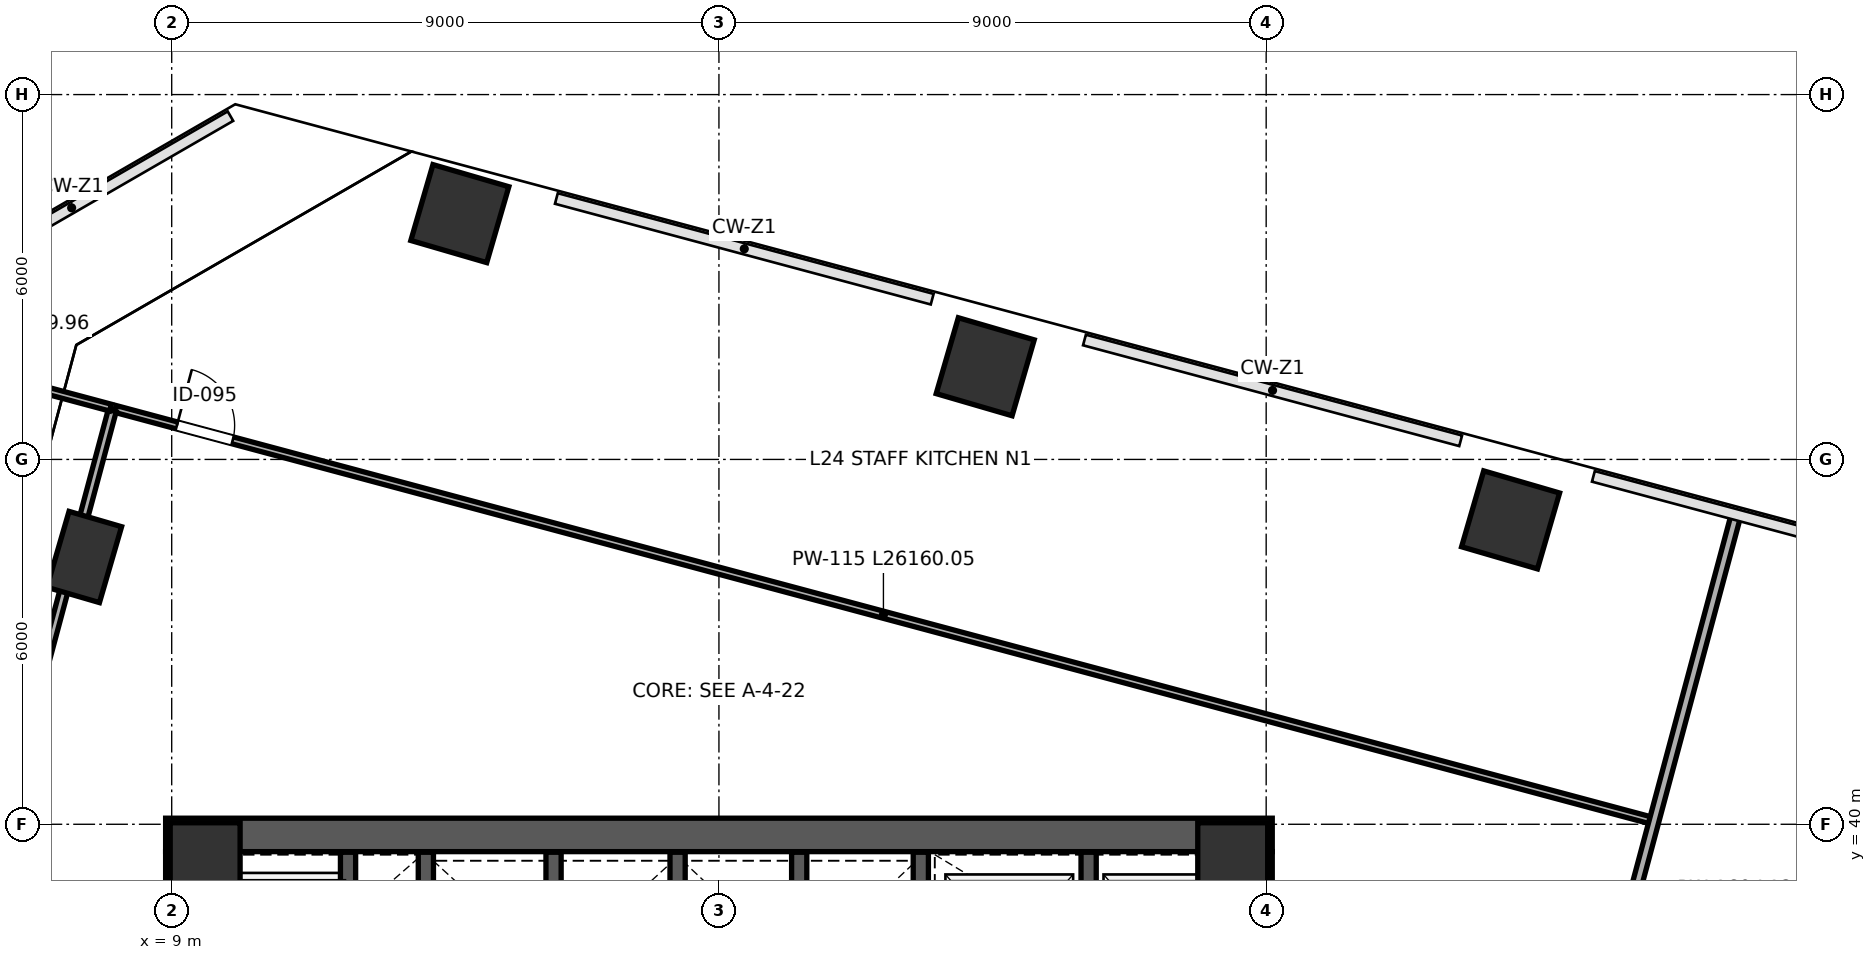
"""IFC4 building model, lengths in metres.
Left out: names, types, materials, properties, quantities, classifications, styles, units other than length and angle.
Written with IfcOpenShell. Run it as: python <this file> out.ifc"""

import sys

from ifc_helpers import new_model, si_unit, direction, frame, frame_2d, origin, origin_2d, place, context, subcontext, project, spatial, rectangle, extrude, clip, halfspace, source, transform, mapped, element, fill, save


model = new_model("IFC4")
c1 = context("Model", 3, precision=1e-05, world=origin(), true_north=direction((0.0, 1.0)))
c2 = subcontext(c1, "Body", "Model", "MODEL_VIEW")
j1 = project(units=[si_unit("LENGTHUNIT", "METRE"), si_unit("PLANEANGLEUNIT", "RADIAN")], contexts=[c1])
p1 = place(None, origin())
s1 = spatial("IfcSite", under=j1, at=p1, CompositionType="ELEMENT")
p2 = place(p1, origin())
s2 = spatial("IfcBuilding", under=s1, at=p2, CompositionType="ELEMENT")
p3 = place(p2, frame((0.0, 0.0, 108.4)))
s3 = spatial("IfcBuildingStorey", under=s2, at=p3, CompositionType="ELEMENT", Elevation=108.4)
m1 = source(origin(), c2, "Body", "SweptSolid", [
    extrude(rectangle(XDim=1.15, YDim=1.15, at=origin_2d()), origin(), (0.0, 0.0, 1.0), 4.199),
])
for number, where, z_axis, x_axis in (
    (1, (9.55, 39.45, 0.001), (0.0, 0.0, 1.0), (1.0, 0.0, 0.0)),
    (2, (26.45, 39.45, 0.001), (0.0, 0.0, 1.0), (1.0, 0.0, 0.0)),
):
    element("IfcColumn", number, at=place(p3, frame(where, z_axis=z_axis, x_axis=x_axis)), inside=s3, PredefinedType="COLUMN", context=c2, shape_type="MappedRepresentation", body=[
        mapped(m1, transform((0.0, 0.0, 0.0), scale=1.0)),
    ])
p4 = place(p3, frame((13.739, 50.042, 0.0), z_axis=(0.093677778231, 0.039090233385, 0.994834874499), x_axis=(0.112802709972, -0.993211324356, 0.028404467863)))
e3 = element("IfcColumn", 3, at=p4, inside=s3, PredefinedType="COLUMN", context=c2, shape_type="Clipping", body=[
    clip(clip(extrude(rectangle(XDim=1.3, YDim=1.3, at=origin_2d()), origin(), (0.0, 0.0, 1.0), 4.222), halfspace(frame((0.0, 0.0, 0.083), z_axis=(0.0, 0.0, -1.0), x_axis=(1.0, 0.0, 0.0)), False)), halfspace(frame((0.0, 0.0, 4.139), z_axis=(0.0, 0.0, 1.0), x_axis=(1.0, 0.0, 0.0)), False)),
])
p5 = place(p3, frame((22.379, 47.524, 0.0), z_axis=(0.080358858552, -0.005446094235, 0.996751119342), x_axis=(-0.343197283927, -0.938992890453, 0.022538322547)))
e4 = element("IfcColumn", 4, at=p5, inside=s3, PredefinedType="COLUMN", context=c2, shape_type="Clipping", body=[
    clip(clip(extrude(rectangle(XDim=1.3, YDim=1.3, at=origin_2d()), origin(), (0.0, 0.0, 1.0), 4.214), halfspace(frame((0.0, 0.0, 0.066), z_axis=(0.0, 0.0, -1.0), x_axis=(1.0, 0.0, 0.0)), False)), halfspace(frame((0.0, 0.0, 4.148), z_axis=(0.0, 0.0, 1.0), x_axis=(1.0, 0.0, 0.0)), False)),
])
p6 = place(p3, frame((31.02, 45.006, 0.0), z_axis=(0.066728027674, -0.04998809712, 0.996518218835), x_axis=(-0.798779681404, -0.601171101376, 0.023330826115)))
e5 = element("IfcColumn", 5, at=p6, inside=s3, PredefinedType="COLUMN", context=c2, shape_type="Clipping", body=[
    clip(clip(extrude(rectangle(XDim=1.3, YDim=1.3, at=origin_2d()), origin(), (0.0, 0.0, 1.0), 4.215), halfspace(frame((0.0, 0.0, 0.068), z_axis=(0.0, 0.0, -1.0), x_axis=(1.0, 0.0, 0.0)), False)), halfspace(frame((0.0, 0.0, 4.147), z_axis=(0.0, 0.0, 1.0), x_axis=(1.0, 0.0, 0.0)), False)),
])
p7 = place(p3, frame((7.562, 44.396, 0.0), z_axis=(0.064855729905, 0.071335517371, 0.995341638966), x_axis=(0.522988465649, -0.85191268616, 0.026978509186)))
e6 = element("IfcColumn", 6, at=p7, inside=s3, PredefinedType="PILASTER", context=c2, shape_type="Clipping", body=[
    clip(clip(extrude(rectangle(XDim=0.9, YDim=1.3, at=origin_2d()), origin(), (0.0, 0.0, 1.0), 4.22), halfspace(frame((0.0, 0.0, 0.073), z_axis=(0.0, 0.0, -1.0), x_axis=(1.0, 0.0, 0.0)), False)), halfspace(frame((0.0, 0.0, 4.146), z_axis=(0.0, 0.0, 1.0), x_axis=(1.0, 0.0, 0.0)), False)),
])
p8 = place(p3, frame((9.175, 24.45, 0.0), z_axis=(0.0, 0.0, 1.0), x_axis=(0.0, 1.0, 0.0)))
e7 = element("IfcWall", 7, at=p8, inside=s3, PredefinedType="SHEAR", context=c2, shape_type="SweptSolid", body=[
    extrude(rectangle(XDim=15.1, YDim=0.55, at=frame_2d((7.55, 0.0))), origin(), (0.0, 0.0, 1.0), 3.96),
])
p9 = place(p3, frame((26.825, 24.45, 0.0), z_axis=(0.0, 0.0, 1.0), x_axis=(0.0, 1.0, 0.0)))
e8 = element("IfcWall", 8, at=p9, inside=s3, PredefinedType="SHEAR", context=c2, shape_type="SweptSolid", body=[
    extrude(rectangle(XDim=15.1, YDim=0.55, at=frame_2d((7.55, 0.0))), origin(), (0.0, 0.0, 1.0), 3.96),
])
p10 = place(p9, frame((8.6, 0.0, 0.0)))
e9 = element("IfcOpeningElement", 9, at=p10, cuts=e8, PredefinedType="OPENING", context=c2, shape_type="SweptSolid", body=[
    extrude(rectangle(XDim=1.15, YDim=2.2, at=frame_2d((0.575, 1.1))), frame((0.0, 0.285, 0.0), z_axis=(0.0, -1.0, 0.0), x_axis=(1.0, 0.0, 0.0)), (0.0, 0.0, 1.0), 0.57),
])
p11 = place(p3, frame((8.9, 39.825, 0.0), z_axis=(0.0, 0.0, 1.0), x_axis=(1.0, 0.0, 0.0)))
e10 = element("IfcWall", 10, at=p11, inside=s3, PredefinedType="SHEAR", context=c2, shape_type="SweptSolid", body=[
    extrude(rectangle(XDim=18.2, YDim=0.55, at=frame_2d((9.1, 0.0))), origin(), (0.0, 0.0, 1.0), 3.96),
])
p12 = place(p3, frame((21.32, 32.12, 0.0), z_axis=(0.0, 0.0, 1.0), x_axis=(0.0, 1.0, 0.0)))
e11 = element("IfcWall", 11, at=p12, inside=s3, PredefinedType="SHEAR", context=c2, shape_type="SweptSolid", body=[
    extrude(rectangle(XDim=7.42, YDim=0.25, at=frame_2d((3.71, 0.0))), origin(), (0.0, 0.0, 1.0), 3.96),
])
p13 = place(p12, frame((1.4, 0.0, 0.0)))
e12 = element("IfcOpeningElement", 12, at=p13, cuts=e11, PredefinedType="OPENING", context=c2, shape_type="SweptSolid", body=[
    extrude(rectangle(XDim=1.15, YDim=2.2, at=frame_2d((0.575, 1.1))), frame((0.0, 0.135, 0.0), z_axis=(0.0, -1.0, 0.0), x_axis=(1.0, 0.0, 0.0)), (0.0, 0.0, 1.0), 0.27),
])
p14 = place(p3, frame((11.9, 36.31, 0.0), z_axis=(0.0, 0.0, 1.0), x_axis=(0.0, 1.0, 0.0)))
e13 = element("IfcWall", 13, at=p14, inside=s3, PredefinedType="SHEAR", context=c2, shape_type="SweptSolid", body=[
    extrude(rectangle(XDim=3.23, YDim=0.25, at=frame_2d((1.615, 0.0))), origin(), (0.0, 0.0, 1.0), 3.96),
])
p15 = place(p3, frame((24.08, 36.48, 0.0), z_axis=(0.0, 0.0, 1.0), x_axis=(0.0, 1.0, 0.0)))
e14 = element("IfcWall", 14, at=p15, inside=s3, PredefinedType="SHEAR", context=c2, shape_type="SweptSolid", body=[
    extrude(rectangle(XDim=3.06, YDim=0.25, at=frame_2d((1.53, 0.0))), origin(), (0.0, 0.0, 1.0), 3.96),
])
for number, where, z_axis, x_axis in (
    (15, (13.18, 35.81, 0.0), (0.0, 0.0, 1.0), (0.0, 1.0, 0.0)),
    (16, (15.28, 35.81, 0.0), (0.0, 0.0, 1.0), (0.0, 1.0, 0.0)),
    (17, (17.32, 35.81, 0.0), (0.0, 0.0, 1.0), (0.0, 1.0, 0.0)),
    (18, (19.32, 35.81, 0.0), (0.0, 0.0, 1.0), (0.0, 1.0, 0.0)),
):
    element("IfcWall", number, at=place(p3, frame(where, z_axis=z_axis, x_axis=x_axis)), inside=s3, PredefinedType="SHEAR", context=c2, shape_type="SweptSolid", body=[
        extrude(rectangle(XDim=3.73, YDim=0.25, at=frame_2d((1.865, 0.0))), origin(), (0.0, 0.0, 1.0), 3.96),
    ])
p16 = place(p3, frame((8.071, 46.831, 0.0), z_axis=(0.0, 0.0, 1.0), x_axis=(0.965925848141, -0.258818963551, 0.0)))
e19 = element("IfcWall", 19, at=p16, inside=s3, PredefinedType="PARTITIONING", context=c2, shape_type="SweptSolid", body=[
    extrude(rectangle(XDim=26.16, YDim=0.115, at=frame_2d((13.08, 0.0))), origin(), (0.0, 0.0, 1.0), 3.96),
])
p17 = place(p16, frame((1.05, 0.0, 0.0)))
e20 = element("IfcOpeningElement", 20, at=p17, cuts=e19, PredefinedType="OPENING", context=c2, shape_type="SweptSolid", body=[
    extrude(rectangle(XDim=0.95, YDim=2.15, at=frame_2d((0.475, 1.075))), frame((0.0, 0.067, 0.0), z_axis=(0.0, -1.0, 0.0), x_axis=(1.0, 0.0, 0.0)), (0.0, 0.0, 1.0), 0.135),
])
p18 = place(p3, frame((1.678, 23.128, 0.0), z_axis=(0.0, 0.0, 1.0), x_axis=(0.258813756198, 0.965927243431, 0.0)))
e21 = element("IfcWall", 21, at=p18, inside=s3, PredefinedType="PARTITIONING", context=c2, shape_type="SweptSolid", body=[
    extrude(rectangle(XDim=24.51, YDim=0.135, at=frame_2d((12.255, 0.0))), origin(), (0.0, 0.0, 1.0), 3.095),
])
p19 = place(p18, frame((3.0, 0.0, 0.0)))
e22 = element("IfcOpeningElement", 22, at=p19, cuts=e21, PredefinedType="OPENING", context=c2, shape_type="SweptSolid", body=[
    extrude(rectangle(XDim=0.95, YDim=2.15, at=frame_2d((0.475, 1.075))), frame((0.0, 0.078, 0.0), z_axis=(0.0, -1.0, 0.0), x_axis=(1.0, 0.0, 0.0)), (0.0, 0.0, 1.0), 0.155),
])
p20 = place(p3, frame((4.487, 47.791, 0.0), z_axis=(0.0, 0.0, 1.0), x_axis=(0.965930639999, -0.258801079426, 0.0)))
e23 = element("IfcWall", 23, at=p20, inside=s3, PredefinedType="PARTITIONING", context=c2, shape_type="SweptSolid", body=[
    extrude(rectangle(XDim=3.63, YDim=0.115, at=frame_2d((1.815, 0.0))), origin(), (0.0, 0.0, 1.0), 3.96),
])
p21 = place(p3, frame((31.445, 32.834, 0.0), z_axis=(0.0, 0.0, 1.0), x_axis=(0.258816538161, 0.965926498018, 0.0)))
e24 = element("IfcWall", 24, at=p21, inside=s3, PredefinedType="PARTITIONING", context=c2, shape_type="SweptSolid", body=[
    extrude(rectangle(XDim=12.64, YDim=0.16, at=frame_2d((6.32, 0.0))), origin(), (0.0, 0.0, 1.0), 3.095),
])
m2 = source(origin(), c2, "Body", "SweptSolid", [
    extrude(rectangle(XDim=0.95, YDim=2.15, at=frame_2d((0.475, 1.075))), frame((0.0, 0.025, 0.0), z_axis=(0.0, -1.0, 0.0), x_axis=(1.0, 0.0, 0.0)), (0.0, 0.0, 1.0), 0.05),
])
p22 = place(p17, origin())
e25 = element("IfcDoor", 25, at=p22, inside=s3, OperationType="SINGLE_SWING_LEFT", PredefinedType="DOOR", context=c2, shape_type="MappedRepresentation", body=[
    mapped(m2, transform((0.0, 0.0, 0.0), scale=1.0)),
])
fill(e20, e25)
save(model, sys.argv[1])
